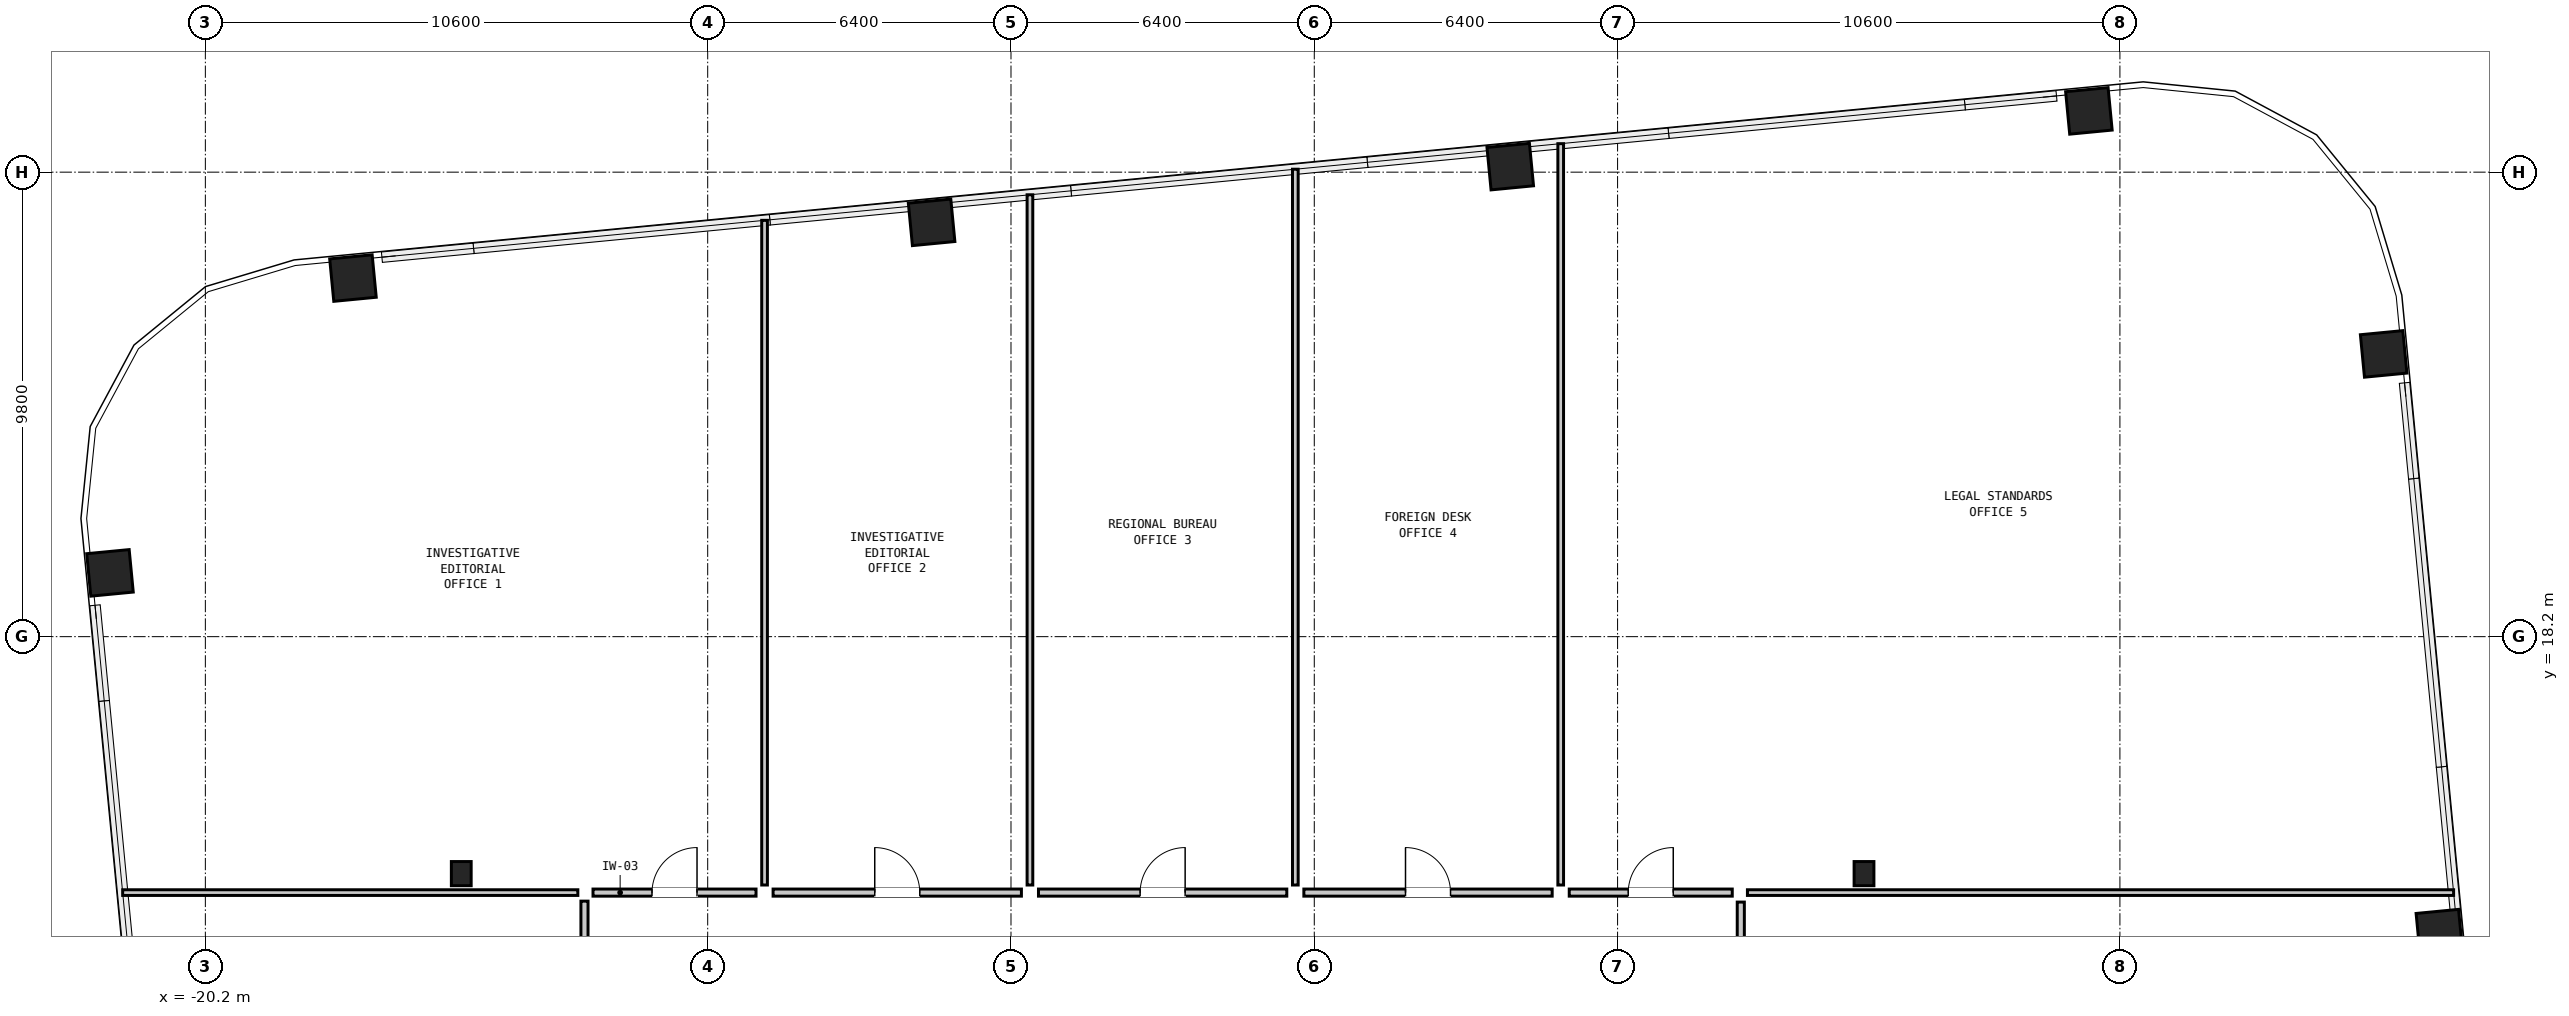
"""IFC4 building model, lengths in metres.
Left out: names, types, materials, properties, quantities, classifications, styles, units other than length and angle.
Written with IfcOpenShell. Run it as: python <this file> out.ifc"""

import sys

from ifc_helpers import new_model, si_unit, direction, frame, frame_2d, origin, origin_2d, place, context, subcontext, project, spatial, rectangle, hollow_rectangle, i_section, extrude, element, fill, save


model = new_model("IFC4")
c1 = context("Model", 3, precision=1e-05, world=origin(), true_north=direction((0.0, 1.0)))
c2 = subcontext(c1, "Body", "Model", "MODEL_VIEW")
j1 = project(units=[si_unit("LENGTHUNIT", "METRE"), si_unit("PLANEANGLEUNIT", "RADIAN")], contexts=[c1])
p1 = place(None, origin())
s1 = spatial("IfcSite", under=j1, at=p1, CompositionType="ELEMENT")
p2 = place(p1, origin())
s2 = spatial("IfcBuilding", under=s1, at=p2, CompositionType="ELEMENT")
p3 = place(p2, frame((0.0, 0.0, 78.6)))
s3 = spatial("IfcBuildingStorey", under=s2, at=p3, CompositionType="ELEMENT", Elevation=78.6)
for number, where, z_axis, x_axis in (
    (1, (26.941, 11.955, 0.0), (0.0, 0.0, 1.0), (-0.096, 0.995, 0.0)),
    (2, (25.765, 24.165, 0.0), (0.0, 0.0, 1.0), (-0.096, 0.995, 0.0)),
    (3, (19.545, 29.292, 0.0), (0.0, 0.0, 1.0), (0.995, 0.096, 0.0)),
    (4, (7.335, 28.117, 0.0), (0.0, 0.0, 1.0), (0.995, 0.096, 0.0)),
    (5, (-4.875, 26.941, 0.0), (0.0, 0.0, 1.0), (0.995, 0.096, 0.0)),
    (6, (-17.085, 25.765, 0.0), (0.0, 0.0, 1.0), (0.995, 0.096, 0.0)),
    (7, (-22.213, 19.545, 0.0), (0.0, 0.0, 1.0), (-0.096, 0.995, 0.0)),
):
    element("IfcColumn", number, at=place(p3, frame(where, z_axis=z_axis, x_axis=x_axis)), inside=s3, PredefinedType="COLUMN", context=c2, shape_type="SweptSolid", body=[
        extrude(hollow_rectangle(XDim=0.9, YDim=0.9, WallThickness=0.055, at=origin_2d()), origin(), (0.0, 0.0, 1.0), 3.05),
    ])
for number, where, z_axis, x_axis in (
    (8, (-14.8, 13.2, 0.0), (0.0, 0.0, 1.0), (1.0, 0.0, 0.0)),
    (9, (14.8, 13.2, 0.0), (0.0, 0.0, 1.0), (1.0, 0.0, 0.0)),
):
    element("IfcColumn", number, at=place(p3, frame(where, z_axis=z_axis, x_axis=x_axis)), inside=s3, PredefinedType="COLUMN", context=c2, shape_type="SweptSolid", body=[
        extrude(i_section(OverallWidth=0.418, OverallDepth=0.51, WebThickness=0.042, FlangeThickness=0.068, at=origin_2d()), origin(), (0.0, 0.0, 1.0), 3.05),
    ])
p4 = place(p3, frame((-21.945, 12.8, 0.0), z_axis=(0.0, 0.0, 1.0), x_axis=(1.0, 0.0, 0.0)))
e10 = element("IfcWall", 10, at=p4, inside=s3, PredefinedType="PARTITIONING", context=c2, shape_type="SweptSolid", body=[
    extrude(rectangle(XDim=9.605, YDim=0.12, at=frame_2d((4.802, 0.0))), origin(), (0.0, 0.0, 1.0), 2.83),
])
p5 = place(p3, frame((12.34, 12.8, 0.0), z_axis=(0.0, 0.0, 1.0), x_axis=(1.0, 0.0, 0.0)))
e11 = element("IfcWall", 11, at=p5, inside=s3, PredefinedType="PARTITIONING", context=c2, shape_type="SweptSolid", body=[
    extrude(rectangle(XDim=14.902, YDim=0.12, at=frame_2d((7.451, 0.0))), origin(), (0.0, 0.0, 1.0), 2.83),
])
p6 = place(p3, frame((-8.4, 12.96, 0.0), z_axis=(0.0, 0.0, 1.0), x_axis=(0.0, 1.0, 0.0)))
e12 = element("IfcWall", 12, at=p6, inside=s3, PredefinedType="PARTITIONING", context=c2, shape_type="SweptSolid", body=[
    extrude(rectangle(XDim=14.023, YDim=0.12, at=frame_2d((7.012, 0.0))), origin(), (0.0, 0.0, 1.0), 2.83),
])
p7 = place(p3, frame((-2.8, 12.96, 0.0), z_axis=(0.0, 0.0, 1.0), x_axis=(0.0, 1.0, 0.0)))
e13 = element("IfcWall", 13, at=p7, inside=s3, PredefinedType="PARTITIONING", context=c2, shape_type="SweptSolid", body=[
    extrude(rectangle(XDim=14.563, YDim=0.12, at=frame_2d((7.281, 0.0))), origin(), (0.0, 0.0, 1.0), 2.274),
])
p8 = place(p3, frame((2.8, 12.96, 0.0), z_axis=(0.0, 0.0, 1.0), x_axis=(0.0, 1.0, 0.0)))
e14 = element("IfcWall", 14, at=p8, inside=s3, PredefinedType="PARTITIONING", context=c2, shape_type="SweptSolid", body=[
    extrude(rectangle(XDim=15.102, YDim=0.12, at=frame_2d((7.551, 0.0))), origin(), (0.0, 0.0, 1.0), 2.274),
])
p9 = place(p3, frame((8.4, 12.96, 0.0), z_axis=(0.0, 0.0, 1.0), x_axis=(0.0, 1.0, 0.0)))
e15 = element("IfcWall", 15, at=p9, inside=s3, PredefinedType="PARTITIONING", context=c2, shape_type="SweptSolid", body=[
    extrude(rectangle(XDim=15.641, YDim=0.12, at=frame_2d((7.821, 0.0))), origin(), (0.0, 0.0, 1.0), 2.83),
])
p10 = place(p3, frame((-12.02, 12.8, 0.0), z_axis=(0.0, 0.0, 1.0), x_axis=(1.0, 0.0, 0.0)))
e16 = element("IfcWall", 16, at=p10, inside=s3, PredefinedType="PARTITIONING", context=c2, shape_type="SweptSolid", body=[
    extrude(rectangle(XDim=3.44, YDim=0.15, at=frame_2d((1.72, 0.0))), origin(), (0.0, 0.0, 1.0), 2.83),
])
p11 = place(p10, frame((1.245, 0.0, 0.0)))
e17 = element("IfcOpeningElement", 17, at=p11, cuts=e16, PredefinedType="OPENING", context=c2, shape_type="SweptSolid", body=[
    extrude(rectangle(XDim=0.95, YDim=2.1, at=frame_2d((0.475, 1.05))), frame((0.0, 0.087, 0.0), z_axis=(0.0, -1.0, 0.0), x_axis=(1.0, 0.0, 0.0)), (0.0, 0.0, 1.0), 0.174),
])
p12 = place(p3, frame((-8.22, 12.8, 0.0), z_axis=(0.0, 0.0, 1.0), x_axis=(1.0, 0.0, 0.0)))
e18 = element("IfcWall", 18, at=p12, inside=s3, PredefinedType="PARTITIONING", context=c2, shape_type="SweptSolid", body=[
    extrude(rectangle(XDim=5.24, YDim=0.15, at=frame_2d((2.62, 0.0))), origin(), (0.0, 0.0, 1.0), 2.83),
])
p13 = place(p12, frame((2.145, 0.0, 0.0)))
e19 = element("IfcOpeningElement", 19, at=p13, cuts=e18, PredefinedType="OPENING", context=c2, shape_type="SweptSolid", body=[
    extrude(rectangle(XDim=0.95, YDim=2.1, at=frame_2d((0.475, 1.05))), frame((0.0, 0.087, 0.0), z_axis=(0.0, -1.0, 0.0), x_axis=(1.0, 0.0, 0.0)), (0.0, 0.0, 1.0), 0.174),
])
p14 = place(p3, frame((-2.62, 12.8, 0.0), z_axis=(0.0, 0.0, 1.0), x_axis=(1.0, 0.0, 0.0)))
e20 = element("IfcWall", 20, at=p14, inside=s3, PredefinedType="PARTITIONING", context=c2, shape_type="SweptSolid", body=[
    extrude(rectangle(XDim=5.24, YDim=0.15, at=frame_2d((2.62, 0.0))), origin(), (0.0, 0.0, 1.0), 2.83),
])
p15 = place(p14, frame((2.145, 0.0, 0.0)))
e21 = element("IfcOpeningElement", 21, at=p15, cuts=e20, PredefinedType="OPENING", context=c2, shape_type="SweptSolid", body=[
    extrude(rectangle(XDim=0.95, YDim=2.1, at=frame_2d((0.475, 1.05))), frame((0.0, 0.087, 0.0), z_axis=(0.0, -1.0, 0.0), x_axis=(1.0, 0.0, 0.0)), (0.0, 0.0, 1.0), 0.174),
])
p16 = place(p3, frame((2.98, 12.8, 0.0), z_axis=(0.0, 0.0, 1.0), x_axis=(1.0, 0.0, 0.0)))
e22 = element("IfcWall", 22, at=p16, inside=s3, PredefinedType="PARTITIONING", context=c2, shape_type="SweptSolid", body=[
    extrude(rectangle(XDim=5.24, YDim=0.15, at=frame_2d((2.62, 0.0))), origin(), (0.0, 0.0, 1.0), 2.83),
])
p17 = place(p16, frame((2.145, 0.0, 0.0)))
e23 = element("IfcOpeningElement", 23, at=p17, cuts=e22, PredefinedType="OPENING", context=c2, shape_type="SweptSolid", body=[
    extrude(rectangle(XDim=0.95, YDim=2.1, at=frame_2d((0.475, 1.05))), frame((0.0, 0.087, 0.0), z_axis=(0.0, -1.0, 0.0), x_axis=(1.0, 0.0, 0.0)), (0.0, 0.0, 1.0), 0.174),
])
p18 = place(p3, frame((8.58, 12.8, 0.0), z_axis=(0.0, 0.0, 1.0), x_axis=(1.0, 0.0, 0.0)))
e24 = element("IfcWall", 24, at=p18, inside=s3, PredefinedType="PARTITIONING", context=c2, shape_type="SweptSolid", body=[
    extrude(rectangle(XDim=3.44, YDim=0.15, at=frame_2d((1.72, 0.0))), origin(), (0.0, 0.0, 1.0), 2.83),
])
p19 = place(p18, frame((1.245, 0.0, 0.0)))
e25 = element("IfcOpeningElement", 25, at=p19, cuts=e24, PredefinedType="OPENING", context=c2, shape_type="SweptSolid", body=[
    extrude(rectangle(XDim=0.95, YDim=2.1, at=frame_2d((0.475, 1.05))), frame((0.0, 0.087, 0.0), z_axis=(0.0, -1.0, 0.0), x_axis=(1.0, 0.0, 0.0)), (0.0, 0.0, 1.0), 0.174),
])
p20 = place(p3, frame((-12.2, 0.18, 0.0), z_axis=(0.0, 0.0, 1.0), x_axis=(0.0, 1.0, 0.0)))
e26 = element("IfcWall", 26, at=p20, inside=s3, PredefinedType="PARTITIONING", context=c2, shape_type="SweptSolid", body=[
    extrude(rectangle(XDim=12.44, YDim=0.15, at=frame_2d((6.22, 0.0))), origin(), (0.0, 0.0, 1.0), 2.83),
])
p21 = place(p20, frame((5.745, 0.0, 0.0)))
e27 = element("IfcOpeningElement", 27, at=p21, cuts=e26, PredefinedType="OPENING", context=c2, shape_type="SweptSolid", body=[
    extrude(rectangle(XDim=0.95, YDim=2.1, at=frame_2d((0.475, 1.05))), frame((0.0, 0.087, 0.0), z_axis=(0.0, -1.0, 0.0), x_axis=(1.0, 0.0, 0.0)), (0.0, 0.0, 1.0), 0.174),
])
p22 = place(p3, frame((12.2, 3.8, 0.0), z_axis=(0.0, 0.0, 1.0), x_axis=(0.0, 1.0, 0.0)))
e28 = element("IfcWall", 28, at=p22, inside=s3, PredefinedType="PARTITIONING", context=c2, shape_type="SweptSolid", body=[
    extrude(rectangle(XDim=8.8, YDim=0.15, at=frame_2d((4.4, 0.0))), origin(), (0.0, 0.0, 1.0), 2.83),
])
p23 = place(p22, frame((3.925, 0.0, 0.0)))
e29 = element("IfcOpeningElement", 29, at=p23, cuts=e28, PredefinedType="OPENING", context=c2, shape_type="SweptSolid", body=[
    extrude(rectangle(XDim=0.95, YDim=2.1, at=frame_2d((0.475, 1.05))), frame((0.0, 0.087, 0.0), z_axis=(0.0, -1.0, 0.0), x_axis=(1.0, 0.0, 0.0)), (0.0, 0.0, 1.0), 0.174),
])
p24 = place(p11, origin())
e30 = element("IfcDoor", 30, at=p24, inside=s3, OperationType="SINGLE_SWING_RIGHT", PredefinedType="DOOR", context=c2, shape_type="SweptSolid", body=[
    extrude(rectangle(XDim=0.95, YDim=2.1, at=frame_2d((0.475, 1.05))), frame((0.0, 0.025, 0.0), z_axis=(0.0, -1.0, 0.0), x_axis=(1.0, 0.0, 0.0)), (0.0, 0.0, 1.0), 0.05),
])
fill(e17, e30)
p25 = place(p13, origin())
e31 = element("IfcDoor", 31, at=p25, inside=s3, OperationType="SINGLE_SWING_LEFT", PredefinedType="DOOR", context=c2, shape_type="SweptSolid", body=[
    extrude(rectangle(XDim=0.95, YDim=2.1, at=frame_2d((0.475, 1.05))), frame((0.0, 0.025, 0.0), z_axis=(0.0, -1.0, 0.0), x_axis=(1.0, 0.0, 0.0)), (0.0, 0.0, 1.0), 0.05),
])
fill(e19, e31)
p26 = place(p15, origin())
e32 = element("IfcDoor", 32, at=p26, inside=s3, OperationType="SINGLE_SWING_RIGHT", PredefinedType="DOOR", context=c2, shape_type="SweptSolid", body=[
    extrude(rectangle(XDim=0.95, YDim=2.1, at=frame_2d((0.475, 1.05))), frame((0.0, 0.025, 0.0), z_axis=(0.0, -1.0, 0.0), x_axis=(1.0, 0.0, 0.0)), (0.0, 0.0, 1.0), 0.05),
])
fill(e21, e32)
p27 = place(p17, origin())
e33 = element("IfcDoor", 33, at=p27, inside=s3, OperationType="SINGLE_SWING_LEFT", PredefinedType="DOOR", context=c2, shape_type="SweptSolid", body=[
    extrude(rectangle(XDim=0.95, YDim=2.1, at=frame_2d((0.475, 1.05))), frame((0.0, 0.025, 0.0), z_axis=(0.0, -1.0, 0.0), x_axis=(1.0, 0.0, 0.0)), (0.0, 0.0, 1.0), 0.05),
])
fill(e23, e33)
p28 = place(p19, origin())
e34 = element("IfcDoor", 34, at=p28, inside=s3, OperationType="SINGLE_SWING_RIGHT", PredefinedType="DOOR", context=c2, shape_type="SweptSolid", body=[
    extrude(rectangle(XDim=0.95, YDim=2.1, at=frame_2d((0.475, 1.05))), frame((0.0, 0.025, 0.0), z_axis=(0.0, -1.0, 0.0), x_axis=(1.0, 0.0, 0.0)), (0.0, 0.0, 1.0), 0.05),
])
fill(e25, e34)
save(model, sys.argv[1])
